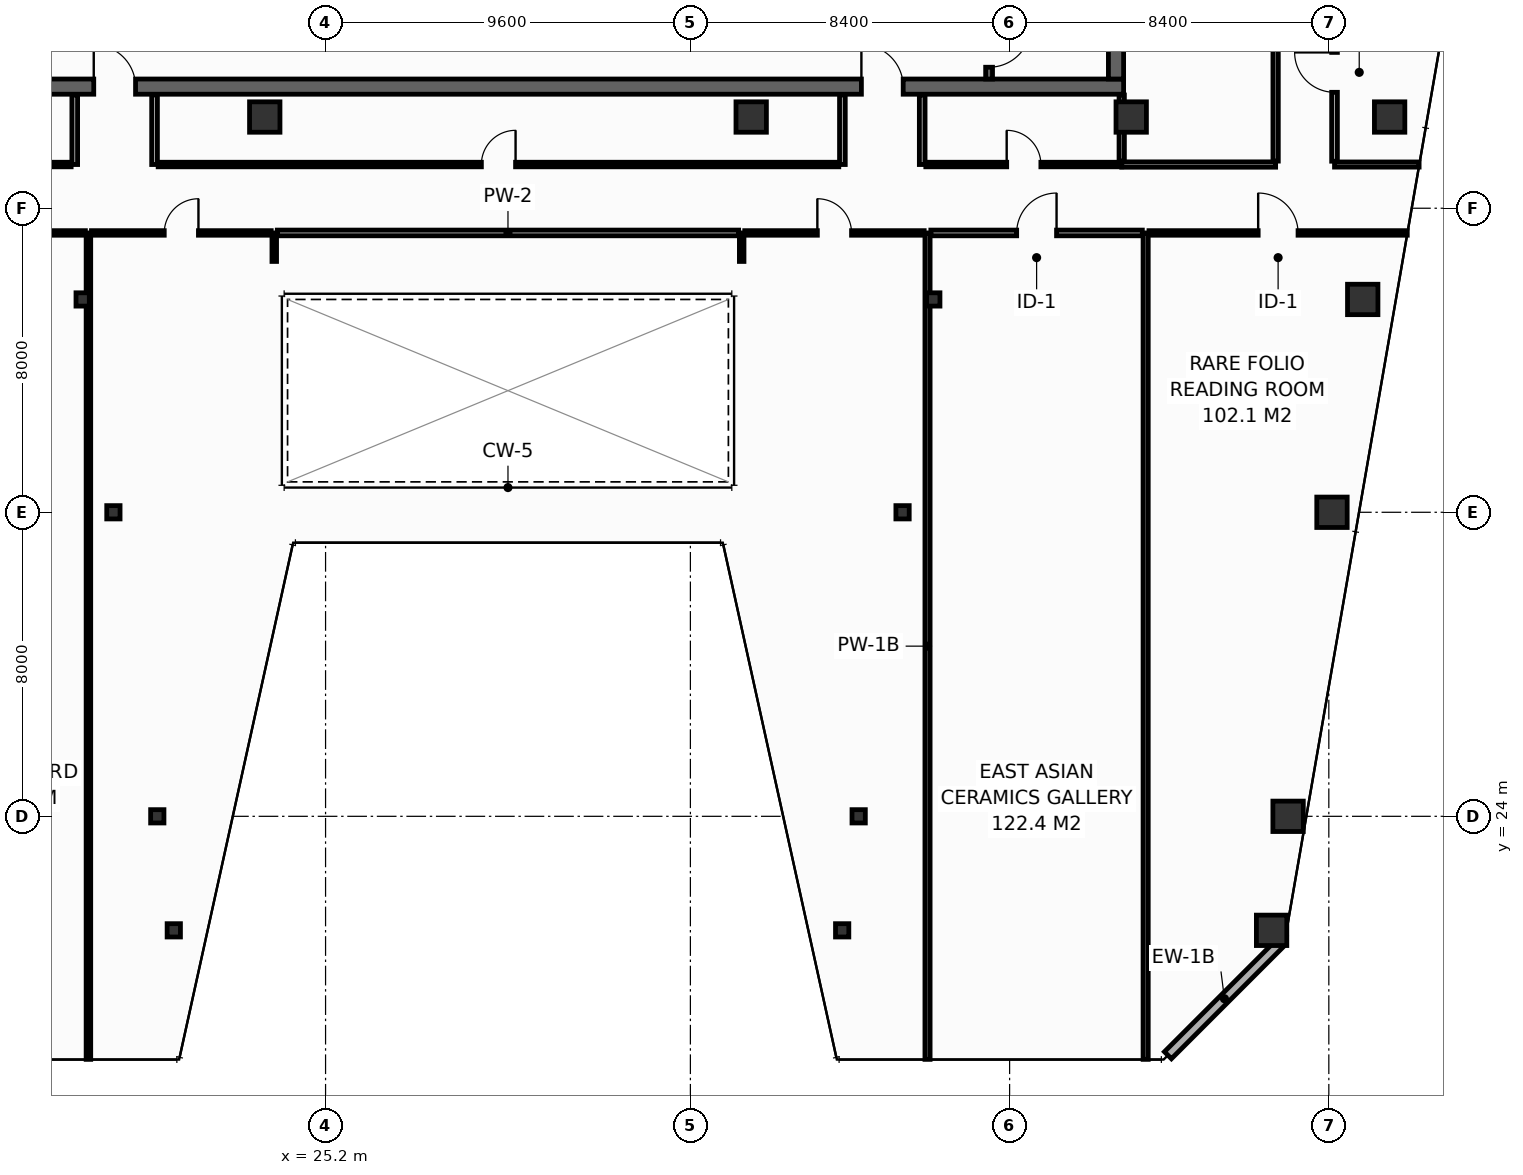
"""IFC4 building model, lengths in metres.
Left out: names, types, materials, properties, quantities, classifications, styles, units other than length and angle.
Written with IfcOpenShell. Run it as: python <this file> out.ifc"""

import sys

from ifc_helpers import new_model, si_unit, direction, frame, frame_2d, origin, origin_2d, place, context, subcontext, project, spatial, rectangle, hollow_rectangle, extrude, element, fill, save


model = new_model("IFC4")
c1 = context("Model", 3, precision=1e-05, world=origin(), true_north=direction((0.0, 1.0)))
c2 = subcontext(c1, "Body", "Model", "MODEL_VIEW")
j1 = project(units=[si_unit("LENGTHUNIT", "METRE"), si_unit("PLANEANGLEUNIT", "RADIAN")], contexts=[c1])
p1 = place(None, origin())
s1 = spatial("IfcSite", under=j1, at=p1, CompositionType="ELEMENT")
p2 = place(p1, origin())
s2 = spatial("IfcBuilding", under=s1, at=p2, CompositionType="ELEMENT")
p3 = place(p2, frame((0.0, 0.0, 245.8)))
s3 = spatial("IfcBuildingStorey", under=s2, at=p3, CompositionType="ELEMENT", Elevation=245.8)
p4 = place(p3, frame((13.7, 43.2, 0.0), z_axis=(0.0, 0.0, 1.0), x_axis=(1.0, 0.0, 0.0)))
e1 = element("IfcWall", 1, at=p4, inside=s3, PredefinedType="SHEAR", context=c2, shape_type="SweptSolid", body=[
    extrude(rectangle(XDim=32.5, YDim=0.4, at=frame_2d((16.25, 0.0))), origin(), (0.0, 0.0, 1.0), 3.55),
])
p5 = place(p4, frame((5.4, 0.0, 0.0)))
e2 = element("IfcOpeningElement", 2, at=p5, cuts=e1, PredefinedType="OPENING", context=c2, shape_type="SweptSolid", body=[
    extrude(rectangle(XDim=1.1, YDim=2.15, at=frame_2d((0.55, 1.075))), frame((0.0, 0.21, 0.0), z_axis=(0.0, -1.0, 0.0), x_axis=(1.0, 0.0, 0.0)), (0.0, 0.0, 1.0), 0.42),
])
p6 = place(p4, frame((25.6, 0.0, 0.0)))
e3 = element("IfcOpeningElement", 3, at=p6, cuts=e1, PredefinedType="OPENING", context=c2, shape_type="SweptSolid", body=[
    extrude(rectangle(XDim=1.1, YDim=2.15, at=frame_2d((0.55, 1.075))), frame((0.0, 0.21, 0.0), z_axis=(0.0, -1.0, 0.0), x_axis=(1.0, 0.0, 0.0)), (0.0, 0.0, 1.0), 0.42),
])
p7 = place(p3, frame((46.0, 43.4, 0.0), z_axis=(0.0, 0.0, 1.0), x_axis=(0.0, 1.0, 0.0)))
e4 = element("IfcWall", 4, at=p7, inside=s3, PredefinedType="SHEAR", context=c2, shape_type="SweptSolid", body=[
    extrude(rectangle(XDim=10.4, YDim=0.4, at=frame_2d((5.2, 0.0))), origin(), (0.0, 0.0, 1.0), 3.55),
])
for number, where, z_axis, x_axis in (
    (5, (23.6, 42.4, 0.0), (0.0, 0.0, 1.0), (1.0, 0.0, 0.0)),
    (6, (36.4, 42.4, 0.0), (0.0, 0.0, 1.0), (1.0, 0.0, 0.0)),
    (7, (46.4, 42.4, 0.0), (0.0, 0.0, 1.0), (1.0, 0.0, 0.0)),
    (8, (53.2, 42.4, 0.0), (0.0, 0.0, 1.0), (1.0, 0.0, 0.0)),
    (9, (50.094, 21.0, 0.0), (0.0, 0.0, 1.0), (1.0, 0.0, 0.0)),
):
    element("IfcColumn", number, at=place(p3, frame(where, z_axis=z_axis, x_axis=x_axis)), inside=s3, PredefinedType="COLUMN", context=c2, shape_type="SweptSolid", body=[
        extrude(hollow_rectangle(XDim=0.8, YDim=0.8, WallThickness=0.036, at=origin_2d()), origin(), (0.0, 0.0, 1.0), 3.8),
    ])
for number, where, z_axis, x_axis in (
    (10, (21.206, 21.0, 0.0), (0.0, 0.0, 1.0), (1.0, 0.0, 0.0)),
    (11, (38.794, 21.0, 0.0), (0.0, 0.0, 1.0), (1.0, 0.0, 0.0)),
):
    element("IfcColumn", number, at=place(p3, frame(where, z_axis=z_axis, x_axis=x_axis)), inside=s3, PredefinedType="COLUMN", context=c2, shape_type="SweptSolid", body=[
        extrude(hollow_rectangle(XDim=0.35, YDim=0.35, WallThickness=0.016, at=origin_2d()), origin(), (0.0, 0.0, 1.0), 3.8),
    ])
p8 = place(p3, frame((50.528, 24.0, 0.0), z_axis=(0.0, 0.0, 1.0), x_axis=(1.0, 0.0, 0.0)))
e12 = element("IfcColumn", 12, at=p8, inside=s3, PredefinedType="COLUMN", context=c2, shape_type="SweptSolid", body=[
    extrude(hollow_rectangle(XDim=0.8, YDim=0.8, WallThickness=0.036, at=origin_2d()), origin(), (0.0, 0.0, 1.0), 3.8),
])
for number, where, z_axis, x_axis in (
    (13, (20.772, 24.0, 0.0), (0.0, 0.0, 1.0), (1.0, 0.0, 0.0)),
    (14, (39.228, 24.0, 0.0), (0.0, 0.0, 1.0), (1.0, 0.0, 0.0)),
):
    element("IfcColumn", number, at=place(p3, frame(where, z_axis=z_axis, x_axis=x_axis)), inside=s3, PredefinedType="COLUMN", context=c2, shape_type="SweptSolid", body=[
        extrude(hollow_rectangle(XDim=0.35, YDim=0.35, WallThickness=0.016, at=origin_2d()), origin(), (0.0, 0.0, 1.0), 3.8),
    ])
p9 = place(p3, frame((51.683, 32.0, 0.0), z_axis=(0.0, 0.0, 1.0), x_axis=(1.0, 0.0, 0.0)))
e15 = element("IfcColumn", 15, at=p9, inside=s3, PredefinedType="COLUMN", context=c2, shape_type="SweptSolid", body=[
    extrude(hollow_rectangle(XDim=0.8, YDim=0.8, WallThickness=0.036, at=origin_2d()), origin(), (0.0, 0.0, 1.0), 3.8),
])
for number, where, z_axis, x_axis in (
    (16, (19.617, 32.0, 0.0), (0.0, 0.0, 1.0), (1.0, 0.0, 0.0)),
    (17, (40.383, 32.0, 0.0), (0.0, 0.0, 1.0), (1.0, 0.0, 0.0)),
):
    element("IfcColumn", number, at=place(p3, frame(where, z_axis=z_axis, x_axis=x_axis)), inside=s3, PredefinedType="COLUMN", context=c2, shape_type="SweptSolid", body=[
        extrude(hollow_rectangle(XDim=0.35, YDim=0.35, WallThickness=0.016, at=origin_2d()), origin(), (0.0, 0.0, 1.0), 3.8),
    ])
p10 = place(p3, frame((52.492, 37.6, 0.0), z_axis=(0.0, 0.0, 1.0), x_axis=(1.0, 0.0, 0.0)))
e18 = element("IfcColumn", 18, at=p10, inside=s3, PredefinedType="COLUMN", context=c2, shape_type="SweptSolid", body=[
    extrude(hollow_rectangle(XDim=0.8, YDim=0.8, WallThickness=0.036, at=origin_2d()), origin(), (0.0, 0.0, 1.0), 3.8),
])
for number, where, z_axis, x_axis in (
    (19, (18.808, 37.6, 0.0), (0.0, 0.0, 1.0), (1.0, 0.0, 0.0)),
    (20, (41.192, 37.6, 0.0), (0.0, 0.0, 1.0), (1.0, 0.0, 0.0)),
):
    element("IfcColumn", number, at=place(p3, frame(where, z_axis=z_axis, x_axis=x_axis)), inside=s3, PredefinedType="COLUMN", context=c2, shape_type="SweptSolid", body=[
        extrude(hollow_rectangle(XDim=0.35, YDim=0.35, WallThickness=0.016, at=origin_2d()), origin(), (0.0, 0.0, 1.0), 3.8),
    ])
p11 = place(p3, frame((42.66, 53.8, 0.0), z_axis=(0.0, 0.0, 1.0), x_axis=(0.0, -1.0, 0.0)))
e21 = element("IfcWall", 21, at=p11, inside=s3, PredefinedType="SHEAR", context=c2, shape_type="SweptSolid", body=[
    extrude(rectangle(XDim=10.4, YDim=0.18, at=frame_2d((5.2, 0.0))), origin(), (0.0, 0.0, 1.0), 3.55),
])
p12 = place(p11, frame((8.99, 0.0, 0.0)))
e22 = element("IfcOpeningElement", 22, at=p12, cuts=e21, PredefinedType="OPENING", context=c2, shape_type="SweptSolid", body=[
    extrude(rectangle(XDim=1.1, YDim=2.15, at=frame_2d((0.55, 1.075))), frame((0.0, 0.1, 0.0), z_axis=(0.0, -1.0, 0.0), x_axis=(1.0, 0.0, 0.0)), (0.0, 0.0, 1.0), 0.2),
])
p13 = place(p3, frame((47.366, 17.713, 0.0), z_axis=(0.0, 0.0, 1.0), x_axis=(0.70707775441, 0.707135806771, 0.0)))
e23 = element("IfcWall", 23, at=p13, inside=s3, PredefinedType="STANDARD", context=c2, shape_type="SweptSolid", body=[
    extrude(rectangle(XDim=4.206, YDim=0.26, at=frame_2d((2.103, 0.0))), origin(), (0.0, 0.0, 1.0), 3.55),
])
p14 = place(p3, frame((46.15, 41.15, 0.0), z_axis=(0.0, 0.0, 1.0), x_axis=(1.0, 0.0, 0.0)))
e24 = element("IfcWall", 24, at=p14, inside=s3, PredefinedType="PARTITIONING", context=c2, shape_type="SweptSolid", body=[
    extrude(rectangle(XDim=4.05, YDim=0.14, at=frame_2d((2.025, 0.0))), origin(), (0.0, 0.0, 1.0), 3.55),
])
p15 = place(p3, frame((46.15, 41.24, 0.0), z_axis=(0.0, 0.0, 1.0), x_axis=(0.0, 1.0, 0.0)))
e25 = element("IfcWall", 25, at=p15, inside=s3, PredefinedType="PARTITIONING", context=c2, shape_type="SweptSolid", body=[
    extrude(rectangle(XDim=1.74, YDim=0.14, at=frame_2d((0.87, 0.0))), origin(), (0.0, 0.0, 1.0), 3.55),
])
p16 = place(p3, frame((50.2, 41.24, 0.0), z_axis=(0.0, 0.0, 1.0), x_axis=(0.0, 1.0, 0.0)))
e26 = element("IfcWall", 26, at=p16, inside=s3, PredefinedType="PARTITIONING", context=c2, shape_type="SweptSolid", body=[
    extrude(rectangle(XDim=6.87, YDim=0.14, at=frame_2d((3.435, 0.0))), origin(), (0.0, 0.0, 1.0), 2.947),
])
p17 = place(p16, frame((2.985, 0.0, 0.0)))
e27 = element("IfcOpeningElement", 27, at=p17, cuts=e26, PredefinedType="OPENING", context=c2, shape_type="SweptSolid", body=[
    extrude(rectangle(XDim=0.9, YDim=2.1, at=frame_2d((0.45, 1.05))), frame((0.0, 0.08, 0.0), z_axis=(0.0, -1.0, 0.0), x_axis=(1.0, 0.0, 0.0)), (0.0, 0.0, 1.0), 0.16),
])
p18 = place(p3, frame((51.75, 41.15, 0.0), z_axis=(0.0, 0.0, 1.0), x_axis=(1.0, 0.0, 0.0)))
e28 = element("IfcWall", 28, at=p18, inside=s3, PredefinedType="PARTITIONING", context=c2, shape_type="SweptSolid", body=[
    extrude(rectangle(XDim=2.226, YDim=0.135, at=frame_2d((1.113, 0.0))), origin(), (0.0, 0.0, 1.0), 3.085),
])
p19 = place(p3, frame((51.75, 41.238, 0.0), z_axis=(0.0, 0.0, 1.0), x_axis=(0.0, 1.0, 0.0)))
e29 = element("IfcWall", 29, at=p19, inside=s3, PredefinedType="PARTITIONING", context=c2, shape_type="SweptSolid", body=[
    extrude(rectangle(XDim=4.675, YDim=0.15, at=frame_2d((2.337, 0.0))), origin(), (0.0, 0.0, 1.0), 2.947),
])
p20 = place(p19, frame((1.813, 0.0, 0.0)))
e30 = element("IfcOpeningElement", 30, at=p20, cuts=e29, PredefinedType="OPENING", context=c2, shape_type="SweptSolid", body=[
    extrude(rectangle(XDim=1.05, YDim=2.15, at=frame_2d((0.525, 1.075))), frame((0.0, 0.085, 0.0), z_axis=(0.0, -1.0, 0.0), x_axis=(1.0, 0.0, 0.0)), (0.0, 0.0, 1.0), 0.17),
])
for number, where, z_axis, x_axis in (
    (31, (18.6, 41.15, 0.0), (0.0, 0.0, 1.0), (0.0, 1.0, 0.0)),
    (32, (20.7, 41.15, 0.0), (0.0, 0.0, 1.0), (0.0, 1.0, 0.0)),
    (33, (38.8, 41.15, 0.0), (0.0, 0.0, 1.0), (0.0, 1.0, 0.0)),
    (34, (40.9, 41.15, 0.0), (0.0, 0.0, 1.0), (0.0, 1.0, 0.0)),
):
    element("IfcWall", number, at=place(p3, frame(where, z_axis=z_axis, x_axis=x_axis)), inside=s3, PredefinedType="PARTITIONING", context=c2, shape_type="SweptSolid", body=[
        extrude(rectangle(XDim=1.83, YDim=0.15, at=frame_2d((0.915, 0.0))), origin(), (0.0, 0.0, 1.0), 3.55),
    ])
p21 = place(p3, frame((13.85, 41.15, 0.0), z_axis=(0.0, 0.0, 1.0), x_axis=(1.0, 0.0, 0.0)))
e35 = element("IfcWall", 35, at=p21, inside=s3, PredefinedType="PARTITIONING", context=c2, shape_type="SweptSolid", body=[
    extrude(rectangle(XDim=4.655, YDim=0.12, at=frame_2d((2.327, 0.0))), origin(), (0.0, 0.0, 1.0), 3.55),
])
p22 = place(p21, frame((1.877, 0.0, 0.0)))
e36 = element("IfcOpeningElement", 36, at=p22, cuts=e35, PredefinedType="OPENING", context=c2, shape_type="SweptSolid", body=[
    extrude(rectangle(XDim=0.9, YDim=2.1, at=frame_2d((0.45, 1.05))), frame((0.0, 0.07, 0.0), z_axis=(0.0, -1.0, 0.0), x_axis=(1.0, 0.0, 0.0)), (0.0, 0.0, 1.0), 0.14),
])
p23 = place(p3, frame((20.795, 41.15, 0.0), z_axis=(0.0, 0.0, 1.0), x_axis=(1.0, 0.0, 0.0)))
e37 = element("IfcWall", 37, at=p23, inside=s3, PredefinedType="PARTITIONING", context=c2, shape_type="SweptSolid", body=[
    extrude(rectangle(XDim=17.91, YDim=0.12, at=frame_2d((8.955, 0.0))), origin(), (0.0, 0.0, 1.0), 2.947),
])
p24 = place(p23, frame((8.505, 0.0, 0.0)))
e38 = element("IfcOpeningElement", 38, at=p24, cuts=e37, PredefinedType="OPENING", context=c2, shape_type="SweptSolid", body=[
    extrude(rectangle(XDim=0.9, YDim=2.1, at=frame_2d((0.45, 1.05))), frame((0.0, 0.07, 0.0), z_axis=(0.0, -1.0, 0.0), x_axis=(1.0, 0.0, 0.0)), (0.0, 0.0, 1.0), 0.14),
])
p25 = place(p3, frame((40.995, 41.15, 0.0), z_axis=(0.0, 0.0, 1.0), x_axis=(1.0, 0.0, 0.0)))
e39 = element("IfcWall", 39, at=p25, inside=s3, PredefinedType="PARTITIONING", context=c2, shape_type="SweptSolid", body=[
    extrude(rectangle(XDim=5.155, YDim=0.12, at=frame_2d((2.577, 0.0))), origin(), (0.0, 0.0, 1.0), 3.55),
])
p26 = place(p25, frame((2.128, 0.0, 0.0)))
e40 = element("IfcOpeningElement", 40, at=p26, cuts=e39, PredefinedType="OPENING", context=c2, shape_type="SweptSolid", body=[
    extrude(rectangle(XDim=0.9, YDim=2.1, at=frame_2d((0.45, 1.05))), frame((0.0, 0.07, 0.0), z_axis=(0.0, -1.0, 0.0), x_axis=(1.0, 0.0, 0.0)), (0.0, 0.0, 1.0), 0.14),
])
p27 = place(p3, frame((18.96, 17.605, 0.0), z_axis=(0.0, 0.0, 1.0), x_axis=(0.0, 1.0, 0.0)))
e41 = element("IfcWall", 41, at=p27, inside=s3, PredefinedType="PARTITIONING", context=c2, shape_type="SweptSolid", body=[
    extrude(rectangle(XDim=21.745, YDim=0.12, at=frame_2d((10.873, 0.0))), origin(), (0.0, 0.0, 1.0), 2.947),
])
for number, where, z_axis, x_axis in (
    (42, (41.04, 17.605, 0.0), (0.0, 0.0, 1.0), (0.0, 1.0, 0.0)),
    (43, (46.78, 17.605, 0.0), (0.0, 0.0, 1.0), (0.0, 1.0, 0.0)),
):
    element("IfcWall", number, at=place(p3, frame(where, z_axis=z_axis, x_axis=x_axis)), inside=s3, PredefinedType="PARTITIONING", context=c2, shape_type="SweptSolid", body=[
        extrude(rectangle(XDim=21.745, YDim=0.135, at=frame_2d((10.873, 0.0))), origin(), (0.0, 0.0, 1.0), 2.947),
    ])
for number, where, z_axis, x_axis in (
    (44, (23.85, 38.6, 0.0), (0.0, 0.0, 1.0), (0.0, 1.0, 0.0)),
    (45, (36.15, 38.6, 0.0), (0.0, 0.0, 1.0), (0.0, 1.0, 0.0)),
):
    element("IfcWall", number, at=place(p3, frame(where, z_axis=z_axis, x_axis=x_axis)), inside=s3, PredefinedType="PARTITIONING", context=c2, shape_type="SweptSolid", body=[
        extrude(rectangle(XDim=0.75, YDim=0.12, at=frame_2d((0.375, 0.0))), origin(), (0.0, 0.0, 1.0), 3.55),
    ])
p28 = place(p3, frame((13.3, 39.35, 0.0), z_axis=(0.0, 0.0, 1.0), x_axis=(1.0, 0.0, 0.0)))
e46 = element("IfcWall", 46, at=p28, inside=s3, PredefinedType="PARTITIONING", context=c2, shape_type="SweptSolid", body=[
    extrude(rectangle(XDim=5.58, YDim=0.12, at=frame_2d((2.79, 0.0))), origin(), (0.0, 0.0, 1.0), 3.55),
])
p29 = place(p28, frame((2.34, 0.0, 0.0)))
e47 = element("IfcOpeningElement", 47, at=p29, cuts=e46, PredefinedType="OPENING", context=c2, shape_type="SweptSolid", body=[
    extrude(rectangle(XDim=0.9, YDim=2.1, at=frame_2d((0.45, 1.05))), frame((0.0, 0.07, 0.0), z_axis=(0.0, -1.0, 0.0), x_axis=(1.0, 0.0, 0.0)), (0.0, 0.0, 1.0), 0.14),
])
p30 = place(p3, frame((19.04, 39.35, 0.0), z_axis=(0.0, 0.0, 1.0), x_axis=(1.0, 0.0, 0.0)))
e48 = element("IfcWall", 48, at=p30, inside=s3, PredefinedType="PARTITIONING", context=c2, shape_type="SweptSolid", body=[
    extrude(rectangle(XDim=4.73, YDim=0.12, at=frame_2d((2.365, 0.0))), origin(), (0.0, 0.0, 1.0), 2.947),
])
p31 = place(p30, frame((1.915, 0.0, 0.0)))
e49 = element("IfcOpeningElement", 49, at=p31, cuts=e48, PredefinedType="OPENING", context=c2, shape_type="SweptSolid", body=[
    extrude(rectangle(XDim=0.9, YDim=2.1, at=frame_2d((0.45, 1.05))), frame((0.0, 0.07, 0.0), z_axis=(0.0, -1.0, 0.0), x_axis=(1.0, 0.0, 0.0)), (0.0, 0.0, 1.0), 0.14),
])
p32 = place(p3, frame((23.93, 39.35, 0.0), z_axis=(0.0, 0.0, 1.0), x_axis=(1.0, 0.0, 0.0)))
e50 = element("IfcWall", 50, at=p32, inside=s3, PredefinedType="PARTITIONING", context=c2, shape_type="SweptSolid", body=[
    extrude(rectangle(XDim=12.14, YDim=0.15, at=frame_2d((6.07, 0.0))), origin(), (0.0, 0.0, 1.0), 3.55),
])
p33 = place(p3, frame((36.23, 39.35, 0.0), z_axis=(0.0, 0.0, 1.0), x_axis=(1.0, 0.0, 0.0)))
e51 = element("IfcWall", 51, at=p33, inside=s3, PredefinedType="PARTITIONING", context=c2, shape_type="SweptSolid", body=[
    extrude(rectangle(XDim=4.722, YDim=0.12, at=frame_2d((2.361, 0.0))), origin(), (0.0, 0.0, 1.0), 2.947),
])
p34 = place(p33, frame((1.911, 0.0, 0.0)))
e52 = element("IfcOpeningElement", 52, at=p34, cuts=e51, PredefinedType="OPENING", context=c2, shape_type="SweptSolid", body=[
    extrude(rectangle(XDim=0.9, YDim=2.1, at=frame_2d((0.45, 1.05))), frame((0.0, 0.07, 0.0), z_axis=(0.0, -1.0, 0.0), x_axis=(1.0, 0.0, 0.0)), (0.0, 0.0, 1.0), 0.14),
])
p35 = place(p3, frame((41.127, 39.35, 0.0), z_axis=(0.0, 0.0, 1.0), x_axis=(1.0, 0.0, 0.0)))
e53 = element("IfcWall", 53, at=p35, inside=s3, PredefinedType="PARTITIONING", context=c2, shape_type="SweptSolid", body=[
    extrude(rectangle(XDim=5.565, YDim=0.15, at=frame_2d((2.782, 0.0))), origin(), (0.0, 0.0, 1.0), 3.55),
])
p36 = place(p35, frame((2.258, 0.0, 0.0)))
e54 = element("IfcOpeningElement", 54, at=p36, cuts=e53, PredefinedType="OPENING", context=c2, shape_type="SweptSolid", body=[
    extrude(rectangle(XDim=1.05, YDim=2.15, at=frame_2d((0.525, 1.075))), frame((0.0, 0.085, 0.0), z_axis=(0.0, -1.0, 0.0), x_axis=(1.0, 0.0, 0.0)), (0.0, 0.0, 1.0), 0.17),
])
p37 = place(p3, frame((46.867, 39.35, 0.0), z_axis=(0.0, 0.0, 1.0), x_axis=(1.0, 0.0, 0.0)))
e55 = element("IfcWall", 55, at=p37, inside=s3, PredefinedType="PARTITIONING", context=c2, shape_type="SweptSolid", body=[
    extrude(rectangle(XDim=6.796, YDim=0.12, at=frame_2d((3.398, 0.0))), origin(), (0.0, 0.0, 1.0), 3.085),
])
p38 = place(p37, frame((2.873, 0.0, 0.0)))
e56 = element("IfcOpeningElement", 56, at=p38, cuts=e55, PredefinedType="OPENING", context=c2, shape_type="SweptSolid", body=[
    extrude(rectangle(XDim=1.05, YDim=2.15, at=frame_2d((0.525, 1.075))), frame((0.0, 0.07, 0.0), z_axis=(0.0, -1.0, 0.0), x_axis=(1.0, 0.0, 0.0)), (0.0, 0.0, 1.0), 0.14),
])
p39 = place(p12, origin())
e57 = element("IfcDoor", 57, at=p39, inside=s3, OperationType="SINGLE_SWING_LEFT", PredefinedType="DOOR", context=c2, shape_type="SweptSolid", body=[
    extrude(rectangle(XDim=1.1, YDim=2.15, at=frame_2d((0.55, 1.075))), frame((0.0, 0.025, 0.0), z_axis=(0.0, -1.0, 0.0), x_axis=(1.0, 0.0, 0.0)), (0.0, 0.0, 1.0), 0.05),
])
fill(e22, e57)
p40 = place(p5, origin())
e58 = element("IfcDoor", 58, at=p40, inside=s3, OperationType="SINGLE_SWING_LEFT", PredefinedType="DOOR", context=c2, shape_type="SweptSolid", body=[
    extrude(rectangle(XDim=1.1, YDim=2.15, at=frame_2d((0.55, 1.075))), frame((0.0, 0.025, 0.0), z_axis=(0.0, -1.0, 0.0), x_axis=(1.0, 0.0, 0.0)), (0.0, 0.0, 1.0), 0.05),
])
fill(e2, e58)
p41 = place(p6, origin())
e59 = element("IfcDoor", 59, at=p41, inside=s3, OperationType="SINGLE_SWING_LEFT", PredefinedType="DOOR", context=c2, shape_type="SweptSolid", body=[
    extrude(rectangle(XDim=1.1, YDim=2.15, at=frame_2d((0.55, 1.075))), frame((0.0, 0.025, 0.0), z_axis=(0.0, -1.0, 0.0), x_axis=(1.0, 0.0, 0.0)), (0.0, 0.0, 1.0), 0.05),
])
fill(e3, e59)
p42 = place(p20, origin())
e60 = element("IfcDoor", 60, at=p42, inside=s3, OperationType="SINGLE_SWING_RIGHT", PredefinedType="DOOR", context=c2, shape_type="SweptSolid", body=[
    extrude(rectangle(XDim=1.05, YDim=2.15, at=frame_2d((0.525, 1.075))), frame((0.0, 0.025, 0.0), z_axis=(0.0, -1.0, 0.0), x_axis=(1.0, 0.0, 0.0)), (0.0, 0.0, 1.0), 0.05),
])
fill(e30, e60)
p43 = place(p24, origin())
e61 = element("IfcDoor", 61, at=p43, inside=s3, OperationType="SINGLE_SWING_RIGHT", PredefinedType="DOOR", context=c2, shape_type="SweptSolid", body=[
    extrude(rectangle(XDim=0.9, YDim=2.1, at=frame_2d((0.45, 1.05))), frame((0.0, 0.025, 0.0), z_axis=(0.0, -1.0, 0.0), x_axis=(1.0, 0.0, 0.0)), (0.0, 0.0, 1.0), 0.05),
])
fill(e38, e61)
p44 = place(p26, origin())
e62 = element("IfcDoor", 62, at=p44, inside=s3, OperationType="SINGLE_SWING_LEFT", PredefinedType="DOOR", context=c2, shape_type="SweptSolid", body=[
    extrude(rectangle(XDim=0.9, YDim=2.1, at=frame_2d((0.45, 1.05))), frame((0.0, 0.025, 0.0), z_axis=(0.0, -1.0, 0.0), x_axis=(1.0, 0.0, 0.0)), (0.0, 0.0, 1.0), 0.05),
])
fill(e40, e62)
p45 = place(p31, origin())
e63 = element("IfcDoor", 63, at=p45, inside=s3, OperationType="SINGLE_SWING_RIGHT", PredefinedType="DOOR", context=c2, shape_type="SweptSolid", body=[
    extrude(rectangle(XDim=0.9, YDim=2.1, at=frame_2d((0.45, 1.05))), frame((0.0, 0.025, 0.0), z_axis=(0.0, -1.0, 0.0), x_axis=(1.0, 0.0, 0.0)), (0.0, 0.0, 1.0), 0.05),
])
fill(e49, e63)
p46 = place(p34, origin())
e64 = element("IfcDoor", 64, at=p46, inside=s3, OperationType="SINGLE_SWING_LEFT", PredefinedType="DOOR", context=c2, shape_type="SweptSolid", body=[
    extrude(rectangle(XDim=0.9, YDim=2.1, at=frame_2d((0.45, 1.05))), frame((0.0, 0.025, 0.0), z_axis=(0.0, -1.0, 0.0), x_axis=(1.0, 0.0, 0.0)), (0.0, 0.0, 1.0), 0.05),
])
fill(e52, e64)
p47 = place(p36, origin())
e65 = element("IfcDoor", 65, at=p47, inside=s3, OperationType="SINGLE_SWING_RIGHT", PredefinedType="DOOR", context=c2, shape_type="SweptSolid", body=[
    extrude(rectangle(XDim=1.05, YDim=2.15, at=frame_2d((0.525, 1.075))), frame((0.0, 0.025, 0.0), z_axis=(0.0, -1.0, 0.0), x_axis=(1.0, 0.0, 0.0)), (0.0, 0.0, 1.0), 0.05),
])
fill(e54, e65)
p48 = place(p38, origin())
e66 = element("IfcDoor", 66, at=p48, inside=s3, OperationType="SINGLE_SWING_LEFT", PredefinedType="DOOR", context=c2, shape_type="SweptSolid", body=[
    extrude(rectangle(XDim=1.05, YDim=2.15, at=frame_2d((0.525, 1.075))), frame((0.0, 0.025, 0.0), z_axis=(0.0, -1.0, 0.0), x_axis=(1.0, 0.0, 0.0)), (0.0, 0.0, 1.0), 0.05),
])
fill(e56, e66)
save(model, sys.argv[1])
